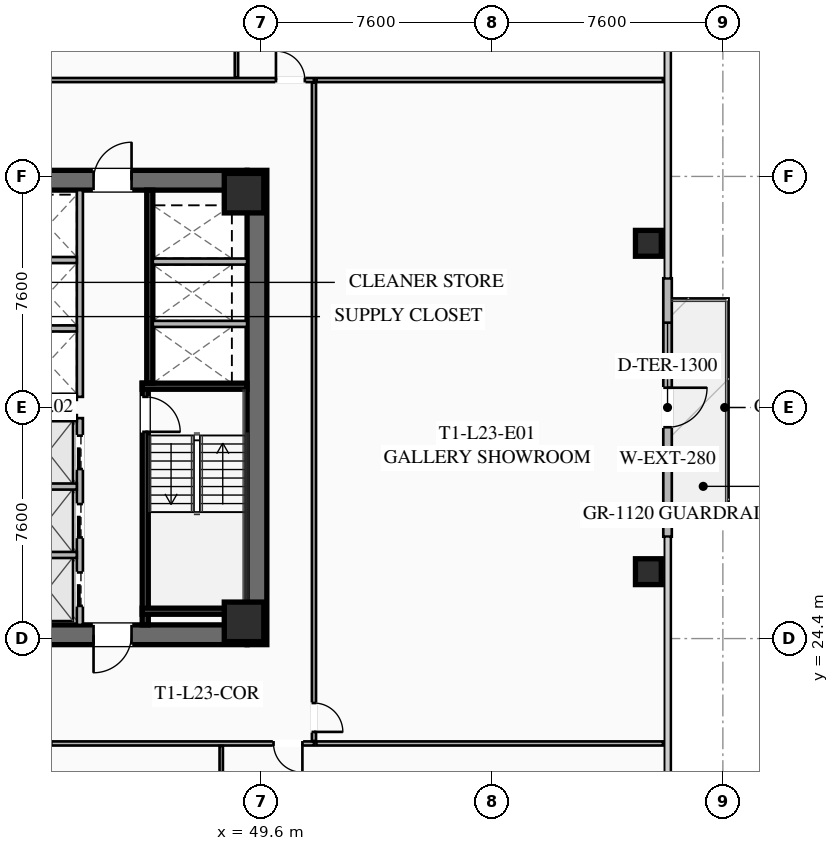
"""IFC4 building model, lengths in metres.
Left out: names, types, materials, properties, quantities, classifications, styles, units other than length and angle.
Written with IfcOpenShell. Run it as: python <this file> out.ifc"""

import sys

from ifc_helpers import new_model, si_unit, direction, frame, frame_2d, origin, origin_2d, place, context, subcontext, project, spatial, rectangle, hollow_rectangle, extrude, element, fill, save


model = new_model("IFC4")
c1 = context("Model", 3, precision=1e-05, world=origin(), true_north=direction((0.0, 1.0)))
c2 = subcontext(c1, "Body", "Model", "MODEL_VIEW")
j1 = project(units=[si_unit("LENGTHUNIT", "METRE"), si_unit("PLANEANGLEUNIT", "RADIAN")], contexts=[c1])
p1 = place(None, origin())
s1 = spatial("IfcSite", under=j1, at=p1, CompositionType="ELEMENT")
p2 = place(p1, origin())
s2 = spatial("IfcBuilding", under=s1, at=p2, CompositionType="ELEMENT")
p3 = place(p2, frame((0.0, 0.0, 88.5)))
s3 = spatial("IfcBuildingStorey", under=s2, at=p3, CompositionType="ELEMENT", Elevation=88.5)
p4 = place(p3, frame((49.475, 39.8, 0.0), z_axis=(0.0, 0.0, 1.0), x_axis=(0.0, -1.0, 0.0)))
e1 = element("IfcWall", 1, at=p4, inside=s3, PredefinedType="SHEAR", context=c2, shape_type="SweptSolid", body=[
    extrude(rectangle(XDim=15.6, YDim=0.65, at=frame_2d((7.8, 0.0))), origin(), (0.0, 0.0, 1.0), 3.55),
])
p5 = place(p3, frame((49.15, 24.525, 0.0), z_axis=(0.0, 0.0, 1.0), x_axis=(-1.0, 0.0, 0.0)))
e2 = element("IfcWall", 2, at=p5, inside=s3, PredefinedType="SHEAR", context=c2, shape_type="SweptSolid", body=[
    extrude(rectangle(XDim=14.3, YDim=0.65, at=frame_2d((7.15, 0.0))), origin(), (0.0, 0.0, 1.0), 3.55),
])
p6 = place(p5, frame((8.85, 0.0, 0.0)))
e3 = element("IfcOpeningElement", 3, at=p6, cuts=e2, PredefinedType="OPENING", context=c2, shape_type="SweptSolid", body=[
    extrude(rectangle(XDim=1.25, YDim=2.25, at=frame_2d((0.625, 1.125))), frame((0.0, 0.335, 0.0), z_axis=(0.0, -1.0, 0.0), x_axis=(1.0, 0.0, 0.0)), (0.0, 0.0, 1.0), 0.67),
])
p7 = place(p5, frame((3.8, 0.0, 0.0)))
e4 = element("IfcOpeningElement", 4, at=p7, cuts=e2, PredefinedType="OPENING", context=c2, shape_type="SweptSolid", body=[
    extrude(rectangle(XDim=1.25, YDim=2.25, at=frame_2d((0.625, 1.125))), frame((0.0, 0.335, 0.0), z_axis=(0.0, -1.0, 0.0), x_axis=(1.0, 0.0, 0.0)), (0.0, 0.0, 1.0), 0.67),
])
p8 = place(p3, frame((34.85, 39.475, 0.0), z_axis=(0.0, 0.0, 1.0), x_axis=(1.0, 0.0, 0.0)))
e5 = element("IfcWall", 5, at=p8, inside=s3, PredefinedType="SHEAR", context=c2, shape_type="SweptSolid", body=[
    extrude(rectangle(XDim=14.3, YDim=0.65, at=frame_2d((7.15, 0.0))), origin(), (0.0, 0.0, 1.0), 3.55),
])
p9 = place(p8, frame((4.2, 0.0, 0.0)))
e6 = element("IfcOpeningElement", 6, at=p9, cuts=e5, PredefinedType="OPENING", context=c2, shape_type="SweptSolid", body=[
    extrude(rectangle(XDim=1.25, YDim=2.25, at=frame_2d((0.625, 1.125))), frame((0.0, 0.335, 0.0), z_axis=(0.0, -1.0, 0.0), x_axis=(1.0, 0.0, 0.0)), (0.0, 0.0, 1.0), 0.67),
])
p10 = place(p8, frame((9.25, 0.0, 0.0)))
e7 = element("IfcOpeningElement", 7, at=p10, cuts=e5, PredefinedType="OPENING", context=c2, shape_type="SweptSolid", body=[
    extrude(rectangle(XDim=1.25, YDim=2.25, at=frame_2d((0.625, 1.125))), frame((0.0, 0.335, 0.0), z_axis=(0.0, -1.0, 0.0), x_axis=(1.0, 0.0, 0.0)), (0.0, 0.0, 1.0), 0.67),
])
for number, where, z_axis, x_axis in (
    (8, (49.05, 24.95, 0.0), (0.0, 0.0, 1.0), (1.0, 0.0, 0.0)),
    (9, (49.05, 39.05, 0.0), (0.0, 0.0, 1.0), (1.0, 0.0, 0.0)),
):
    element("IfcColumn", number, at=place(p3, frame(where, z_axis=z_axis, x_axis=x_axis)), inside=s3, PredefinedType="COLUMN", context=c2, shape_type="SweptSolid", body=[
        extrude(hollow_rectangle(XDim=1.3, YDim=1.3, WallThickness=0.05, at=origin_2d()), origin(), (0.0, 0.0, 1.0), 3.35),
    ])
for number, where, z_axis, x_axis in (
    (10, (62.35, 26.6, 0.0), (0.0, 0.0, 1.0), (1.0, 0.0, 0.0)),
    (11, (62.35, 37.4, 0.0), (0.0, 0.0, 1.0), (1.0, 0.0, 0.0)),
):
    element("IfcColumn", number, at=place(p3, frame(where, z_axis=z_axis, x_axis=x_axis)), inside=s3, PredefinedType="COLUMN", context=c2, shape_type="SweptSolid", body=[
        extrude(hollow_rectangle(XDim=0.85, YDim=0.85, WallThickness=0.035, at=origin_2d()), origin(), (0.0, 0.0, 1.0), 3.35),
    ])
p11 = place(p3, frame((62.98, 36.25, 0.0), z_axis=(0.0, 0.0, 1.0), x_axis=(0.0, -1.0, 0.0)))
e12 = element("IfcWall", 12, at=p11, inside=s3, PredefinedType="SOLIDWALL", context=c2, shape_type="SweptSolid", body=[
    extrude(rectangle(XDim=8.5, YDim=0.28, at=frame_2d((4.25, 0.0))), origin(), (0.0, 0.0, 1.0), 3.35),
])
p12 = place(p11, frame((3.6, 0.0, 0.0)))
e13 = element("IfcOpeningElement", 13, at=p12, cuts=e12, PredefinedType="OPENING", context=c2, shape_type="SweptSolid", body=[
    extrude(rectangle(XDim=1.3, YDim=2.15, at=frame_2d((0.65, 1.075))), frame((0.0, 0.15, 0.0), z_axis=(0.0, -1.0, 0.0), x_axis=(1.0, 0.0, 0.0)), (0.0, 0.0, 1.0), 0.3),
])
p13 = place(p11, frame((1.46, 0.0, 0.85)))
e14 = element("IfcOpeningElement", 14, at=p13, cuts=e12, PredefinedType="OPENING", context=c2, shape_type="SweptSolid", body=[
    extrude(rectangle(XDim=1.8, YDim=1.92, at=frame_2d((0.9, 0.96))), frame((0.0, 0.15, 0.0), z_axis=(0.0, -1.0, 0.0), x_axis=(1.0, 0.0, 0.0)), (0.0, 0.0, 1.0), 0.3),
])
p14 = place(p3, frame((45.8, 32.8, 0.0), z_axis=(0.0, 0.0, 1.0), x_axis=(0.0, -1.0, 0.0)))
e15 = element("IfcWall", 15, at=p14, inside=s3, PredefinedType="SHEAR", context=c2, shape_type="SweptSolid", body=[
    extrude(rectangle(XDim=7.95, YDim=0.2, at=frame_2d((3.975, 0.0))), origin(), (0.0, 0.0, 1.0), 3.35),
])
p15 = place(p14, frame((0.45, 0.0, 0.0)))
e16 = element("IfcOpeningElement", 16, at=p15, cuts=e15, PredefinedType="OPENING", context=c2, shape_type="SweptSolid", body=[
    extrude(rectangle(XDim=1.15, YDim=2.2, at=frame_2d((0.575, 1.1))), frame((0.0, 0.11, 0.0), z_axis=(0.0, -1.0, 0.0), x_axis=(1.0, 0.0, 0.0)), (0.0, 0.0, 1.0), 0.22),
])
for number, where, z_axis, x_axis in (
    (17, (45.7, 32.7, 0.0), (0.0, 0.0, 1.0), (1.0, 0.0, 0.0)),
    (18, (45.7, 25.3, 0.0), (0.0, 0.0, 1.0), (1.0, 0.0, 0.0)),
):
    element("IfcWall", number, at=place(p3, frame(where, z_axis=z_axis, x_axis=x_axis)), inside=s3, PredefinedType="SHEAR", context=c2, shape_type="SweptSolid", body=[
        extrude(rectangle(XDim=3.45, YDim=0.2, at=frame_2d((1.725, 0.0))), origin(), (0.0, 0.0, 1.0), 3.35),
    ])
p16 = place(p3, frame((45.95, 39.15, 0.0), z_axis=(0.0, 0.0, 1.0), x_axis=(0.0, -1.0, 0.0)))
e19 = element("IfcWall", 19, at=p16, inside=s3, PredefinedType="SHEAR", context=c2, shape_type="SweptSolid", body=[
    extrude(rectangle(XDim=6.35, YDim=0.2, at=frame_2d((3.175, 0.0))), origin(), (0.0, 0.0, 1.0), 3.35),
])
for number, where, z_axis, x_axis in (
    (20, (46.05, 34.75, 0.0), (0.0, 0.0, 1.0), (1.0, 0.0, 0.0)),
    (21, (46.05, 36.8, 0.0), (0.0, 0.0, 1.0), (1.0, 0.0, 0.0)),
):
    element("IfcWall", number, at=place(p3, frame(where, z_axis=z_axis, x_axis=x_axis)), inside=s3, PredefinedType="SOLIDWALL", context=c2, shape_type="SweptSolid", body=[
        extrude(rectangle(XDim=3.1, YDim=0.2, at=frame_2d((1.55, 0.0))), origin(), (0.0, 0.0, 1.0), 3.35),
    ])
p17 = place(p3, frame((43.65, 24.85, 0.0), z_axis=(0.0, 0.0, 1.0), x_axis=(0.0, 1.0, 0.0)))
e22 = element("IfcWall", 22, at=p17, inside=s3, PredefinedType="SOLIDWALL", context=c2, shape_type="SweptSolid", body=[
    extrude(rectangle(XDim=6.8, YDim=0.2, at=frame_2d((3.4, 0.0))), origin(), (0.0, 0.0, 1.0), 3.35),
])
p18 = place(p17, frame((0.625, 0.0, 0.0)))
e23 = element("IfcOpeningElement", 23, at=p18, cuts=e22, PredefinedType="OPENING", context=c2, shape_type="SweptSolid", body=[
    extrude(rectangle(XDim=1.1, YDim=2.2, at=frame_2d((0.55, 1.1))), frame((0.0, 0.11, 0.0), z_axis=(0.0, -1.0, 0.0), x_axis=(1.0, 0.0, 0.0)), (0.0, 0.0, 1.0), 0.22),
])
p19 = place(p17, frame((2.875, 0.0, 0.0)))
e24 = element("IfcOpeningElement", 24, at=p19, cuts=e22, PredefinedType="OPENING", context=c2, shape_type="SweptSolid", body=[
    extrude(rectangle(XDim=1.1, YDim=2.2, at=frame_2d((0.55, 1.1))), frame((0.0, 0.11, 0.0), z_axis=(0.0, -1.0, 0.0), x_axis=(1.0, 0.0, 0.0)), (0.0, 0.0, 1.0), 0.22),
])
p20 = place(p17, frame((5.125, 0.0, 0.0)))
e25 = element("IfcOpeningElement", 25, at=p20, cuts=e22, PredefinedType="OPENING", context=c2, shape_type="SweptSolid", body=[
    extrude(rectangle(XDim=1.1, YDim=2.2, at=frame_2d((0.55, 1.1))), frame((0.0, 0.11, 0.0), z_axis=(0.0, -1.0, 0.0), x_axis=(1.0, 0.0, 0.0)), (0.0, 0.0, 1.0), 0.22),
])
for number, where, z_axis, x_axis in (
    (26, (41.67, 27.15, 0.0), (0.0, 0.0, 1.0), (1.0, 0.0, 0.0)),
    (27, (41.67, 29.4, 0.0), (0.0, 0.0, 1.0), (1.0, 0.0, 0.0)),
    (28, (41.67, 31.65, 0.0), (0.0, 0.0, 1.0), (1.0, 0.0, 0.0)),
):
    element("IfcWall", number, at=place(p3, frame(where, z_axis=z_axis, x_axis=x_axis)), inside=s3, PredefinedType="SOLIDWALL", context=c2, shape_type="SweptSolid", body=[
        extrude(rectangle(XDim=1.88, YDim=0.2, at=frame_2d((0.94, 0.0))), origin(), (0.0, 0.0, 1.0), 3.35),
    ])
p21 = place(p3, frame((43.65, 32.35, 0.0), z_axis=(0.0, 0.0, 1.0), x_axis=(0.0, 1.0, 0.0)))
e29 = element("IfcWall", 29, at=p21, inside=s3, PredefinedType="SOLIDWALL", context=c2, shape_type="SweptSolid", body=[
    extrude(rectangle(XDim=6.8, YDim=0.2, at=frame_2d((3.4, 0.0))), origin(), (0.0, 0.0, 1.0), 3.35),
])
for number, where, z_axis, x_axis in (
    (30, (41.67, 32.35, 0.0), (0.0, 0.0, 1.0), (1.0, 0.0, 0.0)),
    (31, (41.67, 34.6, 0.0), (0.0, 0.0, 1.0), (1.0, 0.0, 0.0)),
    (32, (41.67, 36.85, 0.0), (0.0, 0.0, 1.0), (1.0, 0.0, 0.0)),
):
    element("IfcWall", number, at=place(p3, frame(where, z_axis=z_axis, x_axis=x_axis)), inside=s3, PredefinedType="SOLIDWALL", context=c2, shape_type="SweptSolid", body=[
        extrude(rectangle(XDim=1.88, YDim=0.2, at=frame_2d((0.94, 0.0))), origin(), (0.0, 0.0, 1.0), 3.35),
    ])
p22 = place(p3, frame((24.05, 42.77, 0.0), z_axis=(0.0, 0.0, 1.0), x_axis=(1.0, 0.0, 0.0)))
e33 = element("IfcWall", 33, at=p22, inside=s3, PredefinedType="PARTITIONING", context=c2, shape_type="SweptSolid", body=[
    extrude(rectangle(XDim=27.3, YDim=0.135, at=frame_2d((13.65, 0.0))), origin(), (0.0, 0.0, 1.0), 2.703),
])
p23 = place(p22, frame((0.3, 0.0, 0.0)))
e34 = element("IfcOpeningElement", 34, at=p23, cuts=e33, PredefinedType="OPENING", context=c2, shape_type="SweptSolid", body=[
    extrude(rectangle(XDim=0.95, YDim=2.05, at=frame_2d((0.475, 1.025))), frame((0.0, 0.077, 0.0), z_axis=(0.0, -1.0, 0.0), x_axis=(1.0, 0.0, 0.0)), (0.0, 0.0, 1.0), 0.155),
])
p24 = place(p22, frame((13.61, 0.0, 0.0)))
e35 = element("IfcOpeningElement", 35, at=p24, cuts=e33, PredefinedType="OPENING", context=c2, shape_type="SweptSolid", body=[
    extrude(rectangle(XDim=0.95, YDim=2.05, at=frame_2d((0.475, 1.025))), frame((0.0, 0.077, 0.0), z_axis=(0.0, -1.0, 0.0), x_axis=(1.0, 0.0, 0.0)), (0.0, 0.0, 1.0), 0.155),
])
p25 = place(p22, frame((17.633, 0.0, 0.0)))
e36 = element("IfcOpeningElement", 36, at=p25, cuts=e33, PredefinedType="OPENING", context=c2, shape_type="SweptSolid", body=[
    extrude(rectangle(XDim=0.95, YDim=2.05, at=frame_2d((0.475, 1.025))), frame((0.0, 0.077, 0.0), z_axis=(0.0, -1.0, 0.0), x_axis=(1.0, 0.0, 0.0)), (0.0, 0.0, 1.0), 0.155),
])
p26 = place(p22, frame((26.05, 0.0, 0.0)))
e37 = element("IfcOpeningElement", 37, at=p26, cuts=e33, PredefinedType="OPENING", context=c2, shape_type="SweptSolid", body=[
    extrude(rectangle(XDim=0.95, YDim=2.05, at=frame_2d((0.475, 1.025))), frame((0.0, 0.077, 0.0), z_axis=(0.0, -1.0, 0.0), x_axis=(1.0, 0.0, 0.0)), (0.0, 0.0, 1.0), 0.155),
])
p27 = place(p3, frame((48.8, 42.85, 0.0), z_axis=(0.0, 0.0, 1.0), x_axis=(0.0, 1.0, 0.0)))
e38 = element("IfcWall", 38, at=p27, inside=s3, PredefinedType="PARTITIONING", context=c2, shape_type="SweptSolid", body=[
    extrude(rectangle(XDim=10.13, YDim=0.11, at=frame_2d((5.065, 0.0))), origin(), (0.0, 0.0, 1.0), 2.703),
])
p28 = place(p3, frame((51.35, 20.95, 0.0), z_axis=(0.0, 0.0, 1.0), x_axis=(-1.0, 0.0, 0.0)))
e39 = element("IfcWall", 39, at=p28, inside=s3, PredefinedType="PARTITIONING", context=c2, shape_type="SweptSolid", body=[
    extrude(rectangle(XDim=27.3, YDim=0.135, at=frame_2d((13.65, 0.0))), origin(), (0.0, 0.0, 1.0), 2.703),
])
p29 = place(p28, frame((25.97, 0.0, 0.0)))
e40 = element("IfcOpeningElement", 40, at=p29, cuts=e39, PredefinedType="OPENING", context=c2, shape_type="SweptSolid", body=[
    extrude(rectangle(XDim=0.95, YDim=2.05, at=frame_2d((0.475, 1.025))), frame((0.0, 0.077, 0.0), z_axis=(0.0, -1.0, 0.0), x_axis=(1.0, 0.0, 0.0)), (0.0, 0.0, 1.0), 0.155),
])
p30 = place(p28, frame((12.698, 0.0, 0.0)))
e41 = element("IfcOpeningElement", 41, at=p30, cuts=e39, PredefinedType="OPENING", context=c2, shape_type="SweptSolid", body=[
    extrude(rectangle(XDim=0.95, YDim=2.05, at=frame_2d((0.475, 1.025))), frame((0.0, 0.077, 0.0), z_axis=(0.0, -1.0, 0.0), x_axis=(1.0, 0.0, 0.0)), (0.0, 0.0, 1.0), 0.155),
])
p31 = place(p28, frame((8.639, 0.0, 0.0)))
e42 = element("IfcOpeningElement", 42, at=p31, cuts=e39, PredefinedType="OPENING", context=c2, shape_type="SweptSolid", body=[
    extrude(rectangle(XDim=0.95, YDim=2.05, at=frame_2d((0.475, 1.025))), frame((0.0, 0.077, 0.0), z_axis=(0.0, -1.0, 0.0), x_axis=(1.0, 0.0, 0.0)), (0.0, 0.0, 1.0), 0.155),
])
p32 = place(p28, frame((0.38, 0.0, 0.0)))
e43 = element("IfcOpeningElement", 43, at=p32, cuts=e39, PredefinedType="OPENING", context=c2, shape_type="SweptSolid", body=[
    extrude(rectangle(XDim=0.95, YDim=2.05, at=frame_2d((0.475, 1.025))), frame((0.0, 0.077, 0.0), z_axis=(0.0, -1.0, 0.0), x_axis=(1.0, 0.0, 0.0)), (0.0, 0.0, 1.0), 0.155),
])
p33 = place(p3, frame((48.3, 11.02, 0.0), z_axis=(0.0, 0.0, 1.0), x_axis=(0.0, 1.0, 0.0)))
e44 = element("IfcWall", 44, at=p33, inside=s3, PredefinedType="PARTITIONING", context=c2, shape_type="SweptSolid", body=[
    extrude(rectangle(XDim=9.85, YDim=0.11, at=frame_2d((4.925, 0.0))), origin(), (0.0, 0.0, 1.0), 2.703),
])
p34 = place(p3, frame((51.35, 42.69, 0.0), z_axis=(0.0, 0.0, 1.0), x_axis=(0.0, -1.0, 0.0)))
e45 = element("IfcWall", 45, at=p34, inside=s3, PredefinedType="PARTITIONING", context=c2, shape_type="SweptSolid", body=[
    extrude(rectangle(XDim=21.66, YDim=0.135, at=frame_2d((10.83, 0.0))), origin(), (0.0, 0.0, 1.0), 2.703),
])
p35 = place(p34, frame((20.41, 0.0, 0.0)))
e46 = element("IfcOpeningElement", 46, at=p35, cuts=e45, PredefinedType="OPENING", context=c2, shape_type="SweptSolid", body=[
    extrude(rectangle(XDim=0.95, YDim=2.05, at=frame_2d((0.475, 1.025))), frame((0.0, 0.077, 0.0), z_axis=(0.0, -1.0, 0.0), x_axis=(1.0, 0.0, 0.0)), (0.0, 0.0, 1.0), 0.155),
])
for number, where, z_axis, x_axis in (
    (47, (62.83, 42.77, 0.0), (0.0, 0.0, 1.0), (-1.0, 0.0, 0.0)),
    (48, (51.43, 20.95, 0.0), (0.0, 0.0, 1.0), (1.0, 0.0, 0.0)),
):
    element("IfcWall", number, at=place(p3, frame(where, z_axis=z_axis, x_axis=x_axis)), inside=s3, PredefinedType="PARTITIONING", context=c2, shape_type="SweptSolid", body=[
        extrude(rectangle(XDim=11.4, YDim=0.135, at=frame_2d((5.7, 0.0))), origin(), (0.0, 0.0, 1.0), 2.703),
    ])
p36 = place(p12, origin())
e49 = element("IfcDoor", 49, at=p36, inside=s3, OperationType="SINGLE_SWING_LEFT", PredefinedType="DOOR", context=c2, shape_type="SweptSolid", body=[
    extrude(rectangle(XDim=1.3, YDim=2.15, at=frame_2d((0.65, 1.075))), frame((0.0, 0.025, 0.0), z_axis=(0.0, -1.0, 0.0), x_axis=(1.0, 0.0, 0.0)), (0.0, 0.0, 1.0), 0.05),
])
fill(e13, e49)
p37 = place(p13, origin())
e50 = element("IfcWindow", 50, at=p37, inside=s3, PartitioningType="SINGLE_PANEL", PredefinedType="WINDOW", context=c2, shape_type="SweptSolid", body=[
    extrude(rectangle(XDim=1.8, YDim=1.92, at=frame_2d((0.9, 0.96))), frame((0.0, 0.03, 0.0), z_axis=(0.0, -1.0, 0.0), x_axis=(1.0, 0.0, 0.0)), (0.0, 0.0, 1.0), 0.06),
])
fill(e14, e50)
p38 = place(p10, origin())
e51 = element("IfcDoor", 51, at=p38, inside=s3, OperationType="SINGLE_SWING_RIGHT", PredefinedType="DOOR", context=c2, shape_type="SweptSolid", body=[
    extrude(rectangle(XDim=1.25, YDim=2.25, at=frame_2d((0.625, 1.125))), frame((0.0, 0.025, 0.0), z_axis=(0.0, -1.0, 0.0), x_axis=(1.0, 0.0, 0.0)), (0.0, 0.0, 1.0), 0.05),
])
fill(e7, e51)
p39 = place(p7, origin())
e52 = element("IfcDoor", 52, at=p39, inside=s3, OperationType="SINGLE_SWING_RIGHT", PredefinedType="DOOR", context=c2, shape_type="SweptSolid", body=[
    extrude(rectangle(XDim=1.25, YDim=2.25, at=frame_2d((0.625, 1.125))), frame((0.0, 0.025, 0.0), z_axis=(0.0, -1.0, 0.0), x_axis=(1.0, 0.0, 0.0)), (0.0, 0.0, 1.0), 0.05),
])
fill(e4, e52)
p40 = place(p15, origin())
e53 = element("IfcDoor", 53, at=p40, inside=s3, OperationType="SINGLE_SWING_RIGHT", PredefinedType="DOOR", context=c2, shape_type="SweptSolid", body=[
    extrude(rectangle(XDim=1.15, YDim=2.2, at=frame_2d((0.575, 1.1))), frame((0.0, 0.025, 0.0), z_axis=(0.0, -1.0, 0.0), x_axis=(1.0, 0.0, 0.0)), (0.0, 0.0, 1.0), 0.05),
])
fill(e16, e53)
p41 = place(p26, origin())
e54 = element("IfcDoor", 54, at=p41, inside=s3, OperationType="SINGLE_SWING_LEFT", PredefinedType="DOOR", context=c2, shape_type="SweptSolid", body=[
    extrude(rectangle(XDim=0.95, YDim=2.05, at=frame_2d((0.475, 1.025))), frame((0.0, 0.025, 0.0), z_axis=(0.0, -1.0, 0.0), x_axis=(1.0, 0.0, 0.0)), (0.0, 0.0, 1.0), 0.05),
])
fill(e37, e54)
p42 = place(p32, origin())
e55 = element("IfcDoor", 55, at=p42, inside=s3, OperationType="SINGLE_SWING_LEFT", PredefinedType="DOOR", context=c2, shape_type="SweptSolid", body=[
    extrude(rectangle(XDim=0.95, YDim=2.05, at=frame_2d((0.475, 1.025))), frame((0.0, 0.025, 0.0), z_axis=(0.0, -1.0, 0.0), x_axis=(1.0, 0.0, 0.0)), (0.0, 0.0, 1.0), 0.05),
])
fill(e43, e55)
p43 = place(p35, origin())
e56 = element("IfcDoor", 56, at=p43, inside=s3, OperationType="SINGLE_SWING_RIGHT", PredefinedType="DOOR", context=c2, shape_type="SweptSolid", body=[
    extrude(rectangle(XDim=0.95, YDim=2.05, at=frame_2d((0.475, 1.025))), frame((0.0, 0.025, 0.0), z_axis=(0.0, -1.0, 0.0), x_axis=(1.0, 0.0, 0.0)), (0.0, 0.0, 1.0), 0.05),
])
fill(e46, e56)
p44 = place(p18, origin())
e57 = element("IfcDoor", 57, at=p44, inside=s3, OperationType="SLIDING_TO_LEFT", PredefinedType="DOOR", context=c2, shape_type="SweptSolid", body=[
    extrude(rectangle(XDim=1.1, YDim=2.2, at=frame_2d((0.55, 1.1))), frame((0.0, 0.025, 0.0), z_axis=(0.0, -1.0, 0.0), x_axis=(1.0, 0.0, 0.0)), (0.0, 0.0, 1.0), 0.05),
])
fill(e23, e57)
p45 = place(p19, origin())
e58 = element("IfcDoor", 58, at=p45, inside=s3, OperationType="SLIDING_TO_LEFT", PredefinedType="DOOR", context=c2, shape_type="SweptSolid", body=[
    extrude(rectangle(XDim=1.1, YDim=2.2, at=frame_2d((0.55, 1.1))), frame((0.0, 0.025, 0.0), z_axis=(0.0, -1.0, 0.0), x_axis=(1.0, 0.0, 0.0)), (0.0, 0.0, 1.0), 0.05),
])
fill(e24, e58)
p46 = place(p20, origin())
e59 = element("IfcDoor", 59, at=p46, inside=s3, OperationType="SLIDING_TO_LEFT", PredefinedType="DOOR", context=c2, shape_type="SweptSolid", body=[
    extrude(rectangle(XDim=1.1, YDim=2.2, at=frame_2d((0.55, 1.1))), frame((0.0, 0.025, 0.0), z_axis=(0.0, -1.0, 0.0), x_axis=(1.0, 0.0, 0.0)), (0.0, 0.0, 1.0), 0.05),
])
fill(e25, e59)
save(model, sys.argv[1])
